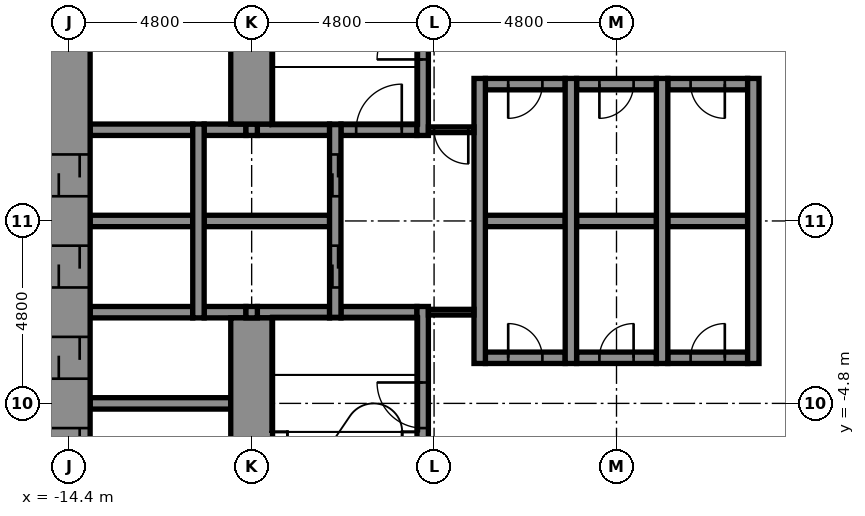
"""IFC4 building model, lengths in metres.
Left out: names, types, materials, properties, quantities, classifications, styles, units other than length and angle.
Written with IfcOpenShell. Run it as: python <this file> out.ifc"""

import sys

from ifc_helpers import new_model, si_unit, direction, frame, frame_2d, origin, place, context, subcontext, project, spatial, rectangle, extrude, element, fill, save


model = new_model("IFC4")
c1 = context("Model", 3, precision=1e-05, world=origin(), true_north=direction((0.0, 1.0)))
c2 = subcontext(c1, "Body", "Model", "MODEL_VIEW")
j1 = project(units=[si_unit("LENGTHUNIT", "METRE"), si_unit("PLANEANGLEUNIT", "RADIAN")], contexts=[c1])
p1 = place(None, origin())
s1 = spatial("IfcSite", under=j1, at=p1, CompositionType="ELEMENT")
p2 = place(p1, origin())
s2 = spatial("IfcBuilding", under=s1, at=p2, CompositionType="ELEMENT")
p3 = place(p2, frame((0.0, 0.0, 71.9)))
s3 = spatial("IfcBuildingStorey", under=s2, at=p3, CompositionType="ELEMENT", Elevation=71.9)
p4 = place(p3, frame((-13.85, -4.8, -0.3), z_axis=(0.0, 0.0, 1.0), x_axis=(1.0, 0.0, 0.0)))
e1 = element("IfcWall", 1, at=p4, inside=s3, PredefinedType="STANDARD", context=c2, shape_type="SweptSolid", body=[
    extrude(rectangle(XDim=3.7, YDim=0.3, at=frame_2d((1.85, 0.0))), origin(), (0.0, 0.0, 1.0), 6.1),
])
p5 = place(p3, frame((-3.45, -3.6, -0.3), z_axis=(0.0, 0.0, 1.0), x_axis=(1.0, 0.0, 0.0)))
e2 = element("IfcWall", 2, at=p5, inside=s3, PredefinedType="STANDARD", context=c2, shape_type="SweptSolid", body=[
    extrude(rectangle(XDim=2.1, YDim=0.3, at=frame_2d((1.05, 0.0))), origin(), (0.0, 0.0, 1.0), 6.1),
])
p6 = place(p5, frame((0.6, 0.0, 0.3)))
e3 = element("IfcOpeningElement", 3, at=p6, cuts=e2, PredefinedType="OPENING", context=c2, shape_type="SweptSolid", body=[
    extrude(rectangle(XDim=0.9, YDim=2.1, at=frame_2d((0.45, 1.05))), frame((0.0, 0.16, 0.0), z_axis=(0.0, -1.0, 0.0), x_axis=(1.0, 0.0, 0.0)), (0.0, 0.0, 1.0), 0.32),
])
p7 = place(p3, frame((-1.05, -3.6, -0.3), z_axis=(0.0, 0.0, 1.0), x_axis=(1.0, 0.0, 0.0)))
e4 = element("IfcWall", 4, at=p7, inside=s3, PredefinedType="STANDARD", context=c2, shape_type="SweptSolid", body=[
    extrude(rectangle(XDim=2.1, YDim=0.3, at=frame_2d((1.05, 0.0))), origin(), (0.0, 0.0, 1.0), 6.1),
])
p8 = place(p7, frame((0.6, 0.0, 0.3)))
e5 = element("IfcOpeningElement", 5, at=p8, cuts=e4, PredefinedType="OPENING", context=c2, shape_type="SweptSolid", body=[
    extrude(rectangle(XDim=0.9, YDim=2.1, at=frame_2d((0.45, 1.05))), frame((0.0, 0.16, 0.0), z_axis=(0.0, -1.0, 0.0), x_axis=(1.0, 0.0, 0.0)), (0.0, 0.0, 1.0), 0.32),
])
p9 = place(p3, frame((1.35, -3.6, -0.3), z_axis=(0.0, 0.0, 1.0), x_axis=(1.0, 0.0, 0.0)))
e6 = element("IfcWall", 6, at=p9, inside=s3, PredefinedType="STANDARD", context=c2, shape_type="SweptSolid", body=[
    extrude(rectangle(XDim=2.1, YDim=0.3, at=frame_2d((1.05, 0.0))), origin(), (0.0, 0.0, 1.0), 6.1),
])
p10 = place(p9, frame((0.6, 0.0, 0.3)))
e7 = element("IfcOpeningElement", 7, at=p10, cuts=e6, PredefinedType="OPENING", context=c2, shape_type="SweptSolid", body=[
    extrude(rectangle(XDim=0.9, YDim=2.1, at=frame_2d((0.45, 1.05))), frame((0.0, 0.16, 0.0), z_axis=(0.0, -1.0, 0.0), x_axis=(1.0, 0.0, 0.0)), (0.0, 0.0, 1.0), 0.32),
])
p11 = place(p3, frame((-13.85, -2.4, -0.3), z_axis=(0.0, 0.0, 1.0), x_axis=(1.0, 0.0, 0.0)))
e8 = element("IfcWall", 8, at=p11, inside=s3, PredefinedType="STANDARD", context=c2, shape_type="SweptSolid", body=[
    extrude(rectangle(XDim=2.7, YDim=0.3, at=frame_2d((1.35, 0.0))), origin(), (0.0, 0.0, 1.0), 6.1),
])
p12 = place(p3, frame((-10.85, -2.4, -0.3), z_axis=(0.0, 0.0, 1.0), x_axis=(1.0, 0.0, 0.0)))
e9 = element("IfcWall", 9, at=p12, inside=s3, PredefinedType="STANDARD", context=c2, shape_type="SweptSolid", body=[
    extrude(rectangle(XDim=1.1, YDim=0.3, at=frame_2d((0.55, 0.0))), origin(), (0.0, 0.0, 1.0), 6.1),
])
p13 = place(p3, frame((-9.45, -2.4, -0.3), z_axis=(0.0, 0.0, 1.0), x_axis=(1.0, 0.0, 0.0)))
e10 = element("IfcWall", 10, at=p13, inside=s3, PredefinedType="STANDARD", context=c2, shape_type="SweptSolid", body=[
    extrude(rectangle(XDim=1.9, YDim=0.3, at=frame_2d((0.95, 0.0))), origin(), (0.0, 0.0, 1.0), 6.1),
])
p14 = place(p3, frame((-7.25, -2.4, -0.3), z_axis=(0.0, 0.0, 1.0), x_axis=(1.0, 0.0, 0.0)))
e11 = element("IfcWall", 11, at=p14, inside=s3, PredefinedType="STANDARD", context=c2, shape_type="SweptSolid", body=[
    extrude(rectangle(XDim=2.0, YDim=0.3, at=frame_2d((1.0, 0.0))), origin(), (0.0, 0.0, 1.0), 6.1),
])
p15 = place(p3, frame((-13.85, 0.0, -0.3), z_axis=(0.0, 0.0, 1.0), x_axis=(1.0, 0.0, 0.0)))
e12 = element("IfcWall", 12, at=p15, inside=s3, PredefinedType="STANDARD", context=c2, shape_type="SweptSolid", body=[
    extrude(rectangle(XDim=2.7, YDim=0.3, at=frame_2d((1.35, 0.0))), origin(), (0.0, 0.0, 1.0), 6.1),
])
p16 = place(p3, frame((-10.85, 0.0, -0.3), z_axis=(0.0, 0.0, 1.0), x_axis=(1.0, 0.0, 0.0)))
e13 = element("IfcWall", 13, at=p16, inside=s3, PredefinedType="STANDARD", context=c2, shape_type="SweptSolid", body=[
    extrude(rectangle(XDim=3.3, YDim=0.3, at=frame_2d((1.65, 0.0))), origin(), (0.0, 0.0, 1.0), 6.1),
])
p17 = place(p3, frame((-3.45, 0.0, -0.3), z_axis=(0.0, 0.0, 1.0), x_axis=(1.0, 0.0, 0.0)))
e14 = element("IfcWall", 14, at=p17, inside=s3, PredefinedType="STANDARD", context=c2, shape_type="SweptSolid", body=[
    extrude(rectangle(XDim=2.1, YDim=0.3, at=frame_2d((1.05, 0.0))), origin(), (0.0, 0.0, 1.0), 6.1),
])
p18 = place(p3, frame((-1.05, 0.0, -0.3), z_axis=(0.0, 0.0, 1.0), x_axis=(1.0, 0.0, 0.0)))
e15 = element("IfcWall", 15, at=p18, inside=s3, PredefinedType="STANDARD", context=c2, shape_type="SweptSolid", body=[
    extrude(rectangle(XDim=2.1, YDim=0.3, at=frame_2d((1.05, 0.0))), origin(), (0.0, 0.0, 1.0), 6.1),
])
p19 = place(p3, frame((1.35, 0.0, -0.3), z_axis=(0.0, 0.0, 1.0), x_axis=(1.0, 0.0, 0.0)))
e16 = element("IfcWall", 16, at=p19, inside=s3, PredefinedType="STANDARD", context=c2, shape_type="SweptSolid", body=[
    extrude(rectangle(XDim=2.1, YDim=0.3, at=frame_2d((1.05, 0.0))), origin(), (0.0, 0.0, 1.0), 6.1),
])
p20 = place(p3, frame((-13.85, 2.4, -0.3), z_axis=(0.0, 0.0, 1.0), x_axis=(1.0, 0.0, 0.0)))
e17 = element("IfcWall", 17, at=p20, inside=s3, PredefinedType="STANDARD", context=c2, shape_type="SweptSolid", body=[
    extrude(rectangle(XDim=2.7, YDim=0.3, at=frame_2d((1.35, 0.0))), origin(), (0.0, 0.0, 1.0), 6.1),
])
p21 = place(p3, frame((-10.85, 2.4, -0.3), z_axis=(0.0, 0.0, 1.0), x_axis=(1.0, 0.0, 0.0)))
e18 = element("IfcWall", 18, at=p21, inside=s3, PredefinedType="STANDARD", context=c2, shape_type="SweptSolid", body=[
    extrude(rectangle(XDim=1.1, YDim=0.3, at=frame_2d((0.55, 0.0))), origin(), (0.0, 0.0, 1.0), 6.1),
])
p22 = place(p3, frame((-9.45, 2.4, -0.3), z_axis=(0.0, 0.0, 1.0), x_axis=(1.0, 0.0, 0.0)))
e19 = element("IfcWall", 19, at=p22, inside=s3, PredefinedType="STANDARD", context=c2, shape_type="SweptSolid", body=[
    extrude(rectangle(XDim=1.9, YDim=0.3, at=frame_2d((0.95, 0.0))), origin(), (0.0, 0.0, 1.0), 6.1),
])
p23 = place(p3, frame((-7.25, 2.4, -0.3), z_axis=(0.0, 0.0, 1.0), x_axis=(1.0, 0.0, 0.0)))
e20 = element("IfcWall", 20, at=p23, inside=s3, PredefinedType="STANDARD", context=c2, shape_type="SweptSolid", body=[
    extrude(rectangle(XDim=2.0, YDim=0.3, at=frame_2d((1.0, 0.0))), origin(), (0.0, 0.0, 1.0), 6.1),
])
p24 = place(p23, frame((0.4, 0.0, 0.3)))
e21 = element("IfcOpeningElement", 21, at=p24, cuts=e20, PredefinedType="OPENING", context=c2, shape_type="SweptSolid", body=[
    extrude(rectangle(XDim=1.2, YDim=2.1, at=frame_2d((0.6, 1.05))), frame((0.0, 0.16, 0.0), z_axis=(0.0, -1.0, 0.0), x_axis=(1.0, 0.0, 0.0)), (0.0, 0.0, 1.0), 0.32),
])
p25 = place(p3, frame((-3.45, 3.6, -0.3), z_axis=(0.0, 0.0, 1.0), x_axis=(1.0, 0.0, 0.0)))
e22 = element("IfcWall", 22, at=p25, inside=s3, PredefinedType="STANDARD", context=c2, shape_type="SweptSolid", body=[
    extrude(rectangle(XDim=2.1, YDim=0.3, at=frame_2d((1.05, 0.0))), origin(), (0.0, 0.0, 1.0), 6.1),
])
p26 = place(p25, frame((0.6, 0.0, 0.3)))
e23 = element("IfcOpeningElement", 23, at=p26, cuts=e22, PredefinedType="OPENING", context=c2, shape_type="SweptSolid", body=[
    extrude(rectangle(XDim=0.9, YDim=2.1, at=frame_2d((0.45, 1.05))), frame((0.0, 0.16, 0.0), z_axis=(0.0, -1.0, 0.0), x_axis=(1.0, 0.0, 0.0)), (0.0, 0.0, 1.0), 0.32),
])
p27 = place(p3, frame((-1.05, 3.6, -0.3), z_axis=(0.0, 0.0, 1.0), x_axis=(1.0, 0.0, 0.0)))
e24 = element("IfcWall", 24, at=p27, inside=s3, PredefinedType="STANDARD", context=c2, shape_type="SweptSolid", body=[
    extrude(rectangle(XDim=2.1, YDim=0.3, at=frame_2d((1.05, 0.0))), origin(), (0.0, 0.0, 1.0), 6.1),
])
p28 = place(p27, frame((0.6, 0.0, 0.3)))
e25 = element("IfcOpeningElement", 25, at=p28, cuts=e24, PredefinedType="OPENING", context=c2, shape_type="SweptSolid", body=[
    extrude(rectangle(XDim=0.9, YDim=2.1, at=frame_2d((0.45, 1.05))), frame((0.0, 0.16, 0.0), z_axis=(0.0, -1.0, 0.0), x_axis=(1.0, 0.0, 0.0)), (0.0, 0.0, 1.0), 0.32),
])
p29 = place(p3, frame((1.35, 3.6, -0.3), z_axis=(0.0, 0.0, 1.0), x_axis=(1.0, 0.0, 0.0)))
e26 = element("IfcWall", 26, at=p29, inside=s3, PredefinedType="STANDARD", context=c2, shape_type="SweptSolid", body=[
    extrude(rectangle(XDim=2.1, YDim=0.3, at=frame_2d((1.05, 0.0))), origin(), (0.0, 0.0, 1.0), 6.1),
])
p30 = place(p29, frame((0.6, 0.0, 0.3)))
e27 = element("IfcOpeningElement", 27, at=p30, cuts=e26, PredefinedType="OPENING", context=c2, shape_type="SweptSolid", body=[
    extrude(rectangle(XDim=0.9, YDim=2.1, at=frame_2d((0.45, 1.05))), frame((0.0, 0.16, 0.0), z_axis=(0.0, -1.0, 0.0), x_axis=(1.0, 0.0, 0.0)), (0.0, 0.0, 1.0), 0.32),
])
p31 = place(p3, frame((-14.4, -10.15, -0.3), z_axis=(0.0, 0.0, 1.0), x_axis=(0.0, 1.0, 0.0)))
e28 = element("IfcWall", 28, at=p31, inside=s3, PredefinedType="SHEAR", context=c2, shape_type="SweptSolid", body=[
    extrude(rectangle(XDim=20.3, YDim=1.1, at=frame_2d((10.15, 0.0))), origin(), (0.0, 0.0, 1.0), 6.1),
])
p32 = place(p31, frame((3.6, 0.0, 0.3)))
e29 = element("IfcOpeningElement", 29, at=p32, cuts=e28, PredefinedType="OPENING", context=c2, shape_type="SweptSolid", body=[
    extrude(rectangle(XDim=1.1, YDim=2.1, at=frame_2d((0.55, 1.05))), frame((0.0, 0.56, 0.0), z_axis=(0.0, -1.0, 0.0), x_axis=(1.0, 0.0, 0.0)), (0.0, 0.0, 1.0), 1.12),
])
p33 = place(p31, frame((6.0, 0.0, 0.3)))
e30 = element("IfcOpeningElement", 30, at=p33, cuts=e28, PredefinedType="OPENING", context=c2, shape_type="SweptSolid", body=[
    extrude(rectangle(XDim=1.1, YDim=2.1, at=frame_2d((0.55, 1.05))), frame((0.0, 0.56, 0.0), z_axis=(0.0, -1.0, 0.0), x_axis=(1.0, 0.0, 0.0)), (0.0, 0.0, 1.0), 1.12),
])
p34 = place(p31, frame((8.4, 0.0, 0.3)))
e31 = element("IfcOpeningElement", 31, at=p34, cuts=e28, PredefinedType="OPENING", context=c2, shape_type="SweptSolid", body=[
    extrude(rectangle(XDim=1.1, YDim=2.1, at=frame_2d((0.55, 1.05))), frame((0.0, 0.56, 0.0), z_axis=(0.0, -1.0, 0.0), x_axis=(1.0, 0.0, 0.0)), (0.0, 0.0, 1.0), 1.12),
])
p35 = place(p31, frame((10.8, 0.0, 0.3)))
e32 = element("IfcOpeningElement", 32, at=p35, cuts=e28, PredefinedType="OPENING", context=c2, shape_type="SweptSolid", body=[
    extrude(rectangle(XDim=1.1, YDim=2.1, at=frame_2d((0.55, 1.05))), frame((0.0, 0.56, 0.0), z_axis=(0.0, -1.0, 0.0), x_axis=(1.0, 0.0, 0.0)), (0.0, 0.0, 1.0), 1.12),
])
p36 = place(p3, frame((-11.0, -2.55, -0.3), z_axis=(0.0, 0.0, 1.0), x_axis=(0.0, 1.0, 0.0)))
e33 = element("IfcWall", 33, at=p36, inside=s3, PredefinedType="STANDARD", context=c2, shape_type="SweptSolid", body=[
    extrude(rectangle(XDim=5.1, YDim=0.3, at=frame_2d((2.55, 0.0))), origin(), (0.0, 0.0, 1.0), 6.1),
])
p37 = place(p3, frame((-9.6, -10.15, -0.3), z_axis=(0.0, 0.0, 1.0), x_axis=(0.0, 1.0, 0.0)))
e34 = element("IfcWall", 34, at=p37, inside=s3, PredefinedType="SHEAR", context=c2, shape_type="SweptSolid", body=[
    extrude(rectangle(XDim=7.6, YDim=1.1, at=frame_2d((3.8, 0.0))), origin(), (0.0, 0.0, 1.0), 6.1),
])
for number, where, z_axis, x_axis in (
    (35, (-9.6, -2.55, -0.3), (0.0, 0.0, 1.0), (0.0, 1.0, 0.0)),
    (36, (-9.6, 2.25, -0.3), (0.0, 0.0, 1.0), (0.0, 1.0, 0.0)),
):
    element("IfcWall", number, at=place(p3, frame(where, z_axis=z_axis, x_axis=x_axis)), inside=s3, PredefinedType="STANDARD", context=c2, shape_type="SweptSolid", body=[
        extrude(rectangle(XDim=0.3, YDim=0.3, at=frame_2d((0.15, 0.0))), origin(), (0.0, 0.0, 1.0), 6.1),
    ])
p38 = place(p3, frame((-9.6, 2.55, -0.3), z_axis=(0.0, 0.0, 1.0), x_axis=(0.0, 1.0, 0.0)))
e37 = element("IfcWall", 37, at=p38, inside=s3, PredefinedType="SHEAR", context=c2, shape_type="SweptSolid", body=[
    extrude(rectangle(XDim=7.6, YDim=1.1, at=frame_2d((3.8, 0.0))), origin(), (0.0, 0.0, 1.0), 6.1),
])
p39 = place(p3, frame((-7.4, -2.55, -0.3), z_axis=(0.0, 0.0, 1.0), x_axis=(0.0, 1.0, 0.0)))
e38 = element("IfcWall", 38, at=p39, inside=s3, PredefinedType="STANDARD", context=c2, shape_type="SweptSolid", body=[
    extrude(rectangle(XDim=5.1, YDim=0.3, at=frame_2d((2.55, 0.0))), origin(), (0.0, 0.0, 1.0), 6.1),
])
p40 = place(p39, frame((0.8, 0.0, 0.3)))
e39 = element("IfcOpeningElement", 39, at=p40, cuts=e38, PredefinedType="OPENING", context=c2, shape_type="SweptSolid", body=[
    extrude(rectangle(XDim=1.1, YDim=2.1, at=frame_2d((0.55, 1.05))), frame((0.0, 0.16, 0.0), z_axis=(0.0, -1.0, 0.0), x_axis=(1.0, 0.0, 0.0)), (0.0, 0.0, 1.0), 0.32),
])
p41 = place(p39, frame((3.2, 0.0, 0.3)))
e40 = element("IfcOpeningElement", 40, at=p41, cuts=e38, PredefinedType="OPENING", context=c2, shape_type="SweptSolid", body=[
    extrude(rectangle(XDim=1.1, YDim=2.1, at=frame_2d((0.55, 1.05))), frame((0.0, 0.16, 0.0), z_axis=(0.0, -1.0, 0.0), x_axis=(1.0, 0.0, 0.0)), (0.0, 0.0, 1.0), 0.32),
])
p42 = place(p3, frame((-5.1, -9.05, -0.3), z_axis=(0.0, 0.0, 1.0), x_axis=(0.0, 1.0, 0.0)))
e41 = element("IfcWall", 41, at=p42, inside=s3, PredefinedType="STANDARD", context=c2, shape_type="SweptSolid", body=[
    extrude(rectangle(XDim=6.8, YDim=0.3, at=frame_2d((3.4, 0.0))), origin(), (0.0, 0.0, 1.0), 6.1),
])
p43 = place(p42, frame((3.6, 0.0, 0.3)))
e42 = element("IfcOpeningElement", 42, at=p43, cuts=e41, PredefinedType="OPENING", context=c2, shape_type="SweptSolid", body=[
    extrude(rectangle(XDim=1.2, YDim=2.1, at=frame_2d((0.6, 1.05))), frame((0.0, 0.16, 0.0), z_axis=(0.0, -1.0, 0.0), x_axis=(1.0, 0.0, 0.0)), (0.0, 0.0, 1.0), 0.32),
])
p44 = place(p3, frame((-5.1, 2.25, -0.3), z_axis=(0.0, 0.0, 1.0), x_axis=(0.0, 1.0, 0.0)))
e43 = element("IfcWall", 43, at=p44, inside=s3, PredefinedType="STANDARD", context=c2, shape_type="SweptSolid", body=[
    extrude(rectangle(XDim=6.8, YDim=0.3, at=frame_2d((3.4, 0.0))), origin(), (0.0, 0.0, 1.0), 6.1),
])
p45 = place(p44, frame((2.0, 0.0, 0.3)))
e44 = element("IfcOpeningElement", 44, at=p45, cuts=e43, PredefinedType="OPENING", context=c2, shape_type="SweptSolid", body=[
    extrude(rectangle(XDim=1.2, YDim=2.1, at=frame_2d((0.6, 1.05))), frame((0.0, 0.16, 0.0), z_axis=(0.0, -1.0, 0.0), x_axis=(1.0, 0.0, 0.0)), (0.0, 0.0, 1.0), 0.32),
])
for number, where, z_axis, x_axis in (
    (45, (-3.6, -3.75, -0.3), (0.0, 0.0, 1.0), (0.0, 1.0, 0.0)),
    (46, (-1.2, -3.75, -0.3), (0.0, 0.0, 1.0), (0.0, 1.0, 0.0)),
    (47, (1.2, -3.75, -0.3), (0.0, 0.0, 1.0), (0.0, 1.0, 0.0)),
    (48, (3.6, -3.75, -0.3), (0.0, 0.0, 1.0), (0.0, 1.0, 0.0)),
):
    element("IfcWall", number, at=place(p3, frame(where, z_axis=z_axis, x_axis=x_axis)), inside=s3, PredefinedType="STANDARD", context=c2, shape_type="SweptSolid", body=[
        extrude(rectangle(XDim=7.5, YDim=0.3, at=frame_2d((3.75, 0.0))), origin(), (0.0, 0.0, 1.0), 6.1),
    ])
p46 = place(p3, frame((-4.95, 2.4, 0.0), z_axis=(0.0, 0.0, 1.0), x_axis=(1.0, 0.0, 0.0)))
e49 = element("IfcWall", 49, at=p46, inside=s3, PredefinedType="PARTITIONING", context=c2, shape_type="SweptSolid", body=[
    extrude(rectangle(XDim=1.2, YDim=0.15, at=frame_2d((0.6, 0.0))), origin(), (0.0, 0.0, 1.0), 5.8),
])
p47 = place(p46, frame((0.15, 0.0, 0.0)))
e50 = element("IfcOpeningElement", 50, at=p47, cuts=e49, PredefinedType="OPENING", context=c2, shape_type="SweptSolid", body=[
    extrude(rectangle(XDim=0.9, YDim=2.1, at=frame_2d((0.45, 1.05))), frame((0.0, 0.085, 0.0), z_axis=(0.0, -1.0, 0.0), x_axis=(1.0, 0.0, 0.0)), (0.0, 0.0, 1.0), 0.17),
])
p48 = place(p3, frame((-4.95, -2.4, 0.0), z_axis=(0.0, 0.0, 1.0), x_axis=(1.0, 0.0, 0.0)))
e51 = element("IfcWall", 51, at=p48, inside=s3, PredefinedType="PARTITIONING", context=c2, shape_type="SweptSolid", body=[
    extrude(rectangle(XDim=1.2, YDim=0.15, at=frame_2d((0.6, 0.0))), origin(), (0.0, 0.0, 1.0), 5.8),
])
p49 = place(p40, origin())
e52 = element("IfcDoor", 52, at=p49, inside=s3, OperationType="DOUBLE_DOOR_SLIDING", PredefinedType="DOOR", context=c2, shape_type="SweptSolid", body=[
    extrude(rectangle(XDim=1.1, YDim=2.1, at=frame_2d((0.55, 1.05))), frame((0.0, 0.025, 0.0), z_axis=(0.0, -1.0, 0.0), x_axis=(1.0, 0.0, 0.0)), (0.0, 0.0, 1.0), 0.05),
])
fill(e39, e52)
p50 = place(p41, origin())
e53 = element("IfcDoor", 53, at=p50, inside=s3, OperationType="DOUBLE_DOOR_SLIDING", PredefinedType="DOOR", context=c2, shape_type="SweptSolid", body=[
    extrude(rectangle(XDim=1.1, YDim=2.1, at=frame_2d((0.55, 1.05))), frame((0.0, 0.025, 0.0), z_axis=(0.0, -1.0, 0.0), x_axis=(1.0, 0.0, 0.0)), (0.0, 0.0, 1.0), 0.05),
])
fill(e40, e53)
p51 = place(p32, origin())
e54 = element("IfcDoor", 54, at=p51, inside=s3, OperationType="DOUBLE_DOOR_SLIDING", PredefinedType="DOOR", context=c2, shape_type="SweptSolid", body=[
    extrude(rectangle(XDim=1.1, YDim=2.1, at=frame_2d((0.55, 1.05))), frame((0.0, 0.025, 0.0), z_axis=(0.0, -1.0, 0.0), x_axis=(1.0, 0.0, 0.0)), (0.0, 0.0, 1.0), 0.05),
])
fill(e29, e54)
p52 = place(p33, origin())
e55 = element("IfcDoor", 55, at=p52, inside=s3, OperationType="DOUBLE_DOOR_SLIDING", PredefinedType="DOOR", context=c2, shape_type="SweptSolid", body=[
    extrude(rectangle(XDim=1.1, YDim=2.1, at=frame_2d((0.55, 1.05))), frame((0.0, 0.025, 0.0), z_axis=(0.0, -1.0, 0.0), x_axis=(1.0, 0.0, 0.0)), (0.0, 0.0, 1.0), 0.05),
])
fill(e30, e55)
p53 = place(p34, origin())
e56 = element("IfcDoor", 56, at=p53, inside=s3, OperationType="DOUBLE_DOOR_SLIDING", PredefinedType="DOOR", context=c2, shape_type="SweptSolid", body=[
    extrude(rectangle(XDim=1.1, YDim=2.1, at=frame_2d((0.55, 1.05))), frame((0.0, 0.025, 0.0), z_axis=(0.0, -1.0, 0.0), x_axis=(1.0, 0.0, 0.0)), (0.0, 0.0, 1.0), 0.05),
])
fill(e31, e56)
p54 = place(p35, origin())
e57 = element("IfcDoor", 57, at=p54, inside=s3, OperationType="DOUBLE_DOOR_SLIDING", PredefinedType="DOOR", context=c2, shape_type="SweptSolid", body=[
    extrude(rectangle(XDim=1.1, YDim=2.1, at=frame_2d((0.55, 1.05))), frame((0.0, 0.025, 0.0), z_axis=(0.0, -1.0, 0.0), x_axis=(1.0, 0.0, 0.0)), (0.0, 0.0, 1.0), 0.05),
])
fill(e32, e57)
p55 = place(p45, origin())
e58 = element("IfcDoor", 58, at=p55, inside=s3, OperationType="SINGLE_SWING_LEFT", PredefinedType="DOOR", context=c2, shape_type="SweptSolid", body=[
    extrude(rectangle(XDim=1.2, YDim=2.1, at=frame_2d((0.6, 1.05))), frame((0.0, 0.025, 0.0), z_axis=(0.0, -1.0, 0.0), x_axis=(1.0, 0.0, 0.0)), (0.0, 0.0, 1.0), 0.05),
])
fill(e44, e58)
p56 = place(p43, origin())
e59 = element("IfcDoor", 59, at=p56, inside=s3, OperationType="SINGLE_SWING_RIGHT", PredefinedType="DOOR", context=c2, shape_type="SweptSolid", body=[
    extrude(rectangle(XDim=1.2, YDim=2.1, at=frame_2d((0.6, 1.05))), frame((0.0, 0.025, 0.0), z_axis=(0.0, -1.0, 0.0), x_axis=(1.0, 0.0, 0.0)), (0.0, 0.0, 1.0), 0.05),
])
fill(e42, e59)
p57 = place(p26, frame((0.9, 0.0, 0.0), z_axis=(0.0, 0.0, 1.0), x_axis=(-1.0, 0.0, 0.0)))
e60 = element("IfcDoor", 60, at=p57, inside=s3, OperationType="SINGLE_SWING_LEFT", PredefinedType="DOOR", context=c2, shape_type="SweptSolid", body=[
    extrude(rectangle(XDim=0.9, YDim=2.1, at=frame_2d((0.45, 1.05))), frame((0.0, 0.025, 0.0), z_axis=(0.0, -1.0, 0.0), x_axis=(1.0, 0.0, 0.0)), (0.0, 0.0, 1.0), 0.05),
])
fill(e23, e60)
p58 = place(p28, frame((0.9, 0.0, 0.0), z_axis=(0.0, 0.0, 1.0), x_axis=(-1.0, 0.0, 0.0)))
e61 = element("IfcDoor", 61, at=p58, inside=s3, OperationType="SINGLE_SWING_LEFT", PredefinedType="DOOR", context=c2, shape_type="SweptSolid", body=[
    extrude(rectangle(XDim=0.9, YDim=2.1, at=frame_2d((0.45, 1.05))), frame((0.0, 0.025, 0.0), z_axis=(0.0, -1.0, 0.0), x_axis=(1.0, 0.0, 0.0)), (0.0, 0.0, 1.0), 0.05),
])
fill(e25, e61)
p59 = place(p30, frame((0.9, 0.0, 0.0), z_axis=(0.0, 0.0, 1.0), x_axis=(-1.0, 0.0, 0.0)))
e62 = element("IfcDoor", 62, at=p59, inside=s3, OperationType="SINGLE_SWING_RIGHT", PredefinedType="DOOR", context=c2, shape_type="SweptSolid", body=[
    extrude(rectangle(XDim=0.9, YDim=2.1, at=frame_2d((0.45, 1.05))), frame((0.0, 0.025, 0.0), z_axis=(0.0, -1.0, 0.0), x_axis=(1.0, 0.0, 0.0)), (0.0, 0.0, 1.0), 0.05),
])
fill(e27, e62)
p60 = place(p6, origin())
e63 = element("IfcDoor", 63, at=p60, inside=s3, OperationType="SINGLE_SWING_LEFT", PredefinedType="DOOR", context=c2, shape_type="SweptSolid", body=[
    extrude(rectangle(XDim=0.9, YDim=2.1, at=frame_2d((0.45, 1.05))), frame((0.0, 0.025, 0.0), z_axis=(0.0, -1.0, 0.0), x_axis=(1.0, 0.0, 0.0)), (0.0, 0.0, 1.0), 0.05),
])
fill(e3, e63)
p61 = place(p8, origin())
e64 = element("IfcDoor", 64, at=p61, inside=s3, OperationType="SINGLE_SWING_RIGHT", PredefinedType="DOOR", context=c2, shape_type="SweptSolid", body=[
    extrude(rectangle(XDim=0.9, YDim=2.1, at=frame_2d((0.45, 1.05))), frame((0.0, 0.025, 0.0), z_axis=(0.0, -1.0, 0.0), x_axis=(1.0, 0.0, 0.0)), (0.0, 0.0, 1.0), 0.05),
])
fill(e5, e64)
p62 = place(p10, origin())
e65 = element("IfcDoor", 65, at=p62, inside=s3, OperationType="SINGLE_SWING_RIGHT", PredefinedType="DOOR", context=c2, shape_type="SweptSolid", body=[
    extrude(rectangle(XDim=0.9, YDim=2.1, at=frame_2d((0.45, 1.05))), frame((0.0, 0.025, 0.0), z_axis=(0.0, -1.0, 0.0), x_axis=(1.0, 0.0, 0.0)), (0.0, 0.0, 1.0), 0.05),
])
fill(e7, e65)
p63 = place(p47, frame((0.9, 0.0, 0.0), z_axis=(0.0, 0.0, 1.0), x_axis=(-1.0, 0.0, 0.0)))
e66 = element("IfcDoor", 66, at=p63, inside=s3, OperationType="SINGLE_SWING_RIGHT", PredefinedType="DOOR", context=c2, shape_type="SweptSolid", body=[
    extrude(rectangle(XDim=0.9, YDim=2.1, at=frame_2d((0.45, 1.05))), frame((0.0, 0.025, 0.0), z_axis=(0.0, -1.0, 0.0), x_axis=(1.0, 0.0, 0.0)), (0.0, 0.0, 1.0), 0.05),
])
fill(e50, e66)
p64 = place(p24, origin())
e67 = element("IfcDoor", 67, at=p64, inside=s3, OperationType="SINGLE_SWING_RIGHT", PredefinedType="DOOR", context=c2, shape_type="SweptSolid", body=[
    extrude(rectangle(XDim=1.2, YDim=2.1, at=frame_2d((0.6, 1.05))), frame((0.0, 0.025, 0.0), z_axis=(0.0, -1.0, 0.0), x_axis=(1.0, 0.0, 0.0)), (0.0, 0.0, 1.0), 0.05),
])
fill(e21, e67)
save(model, sys.argv[1])
